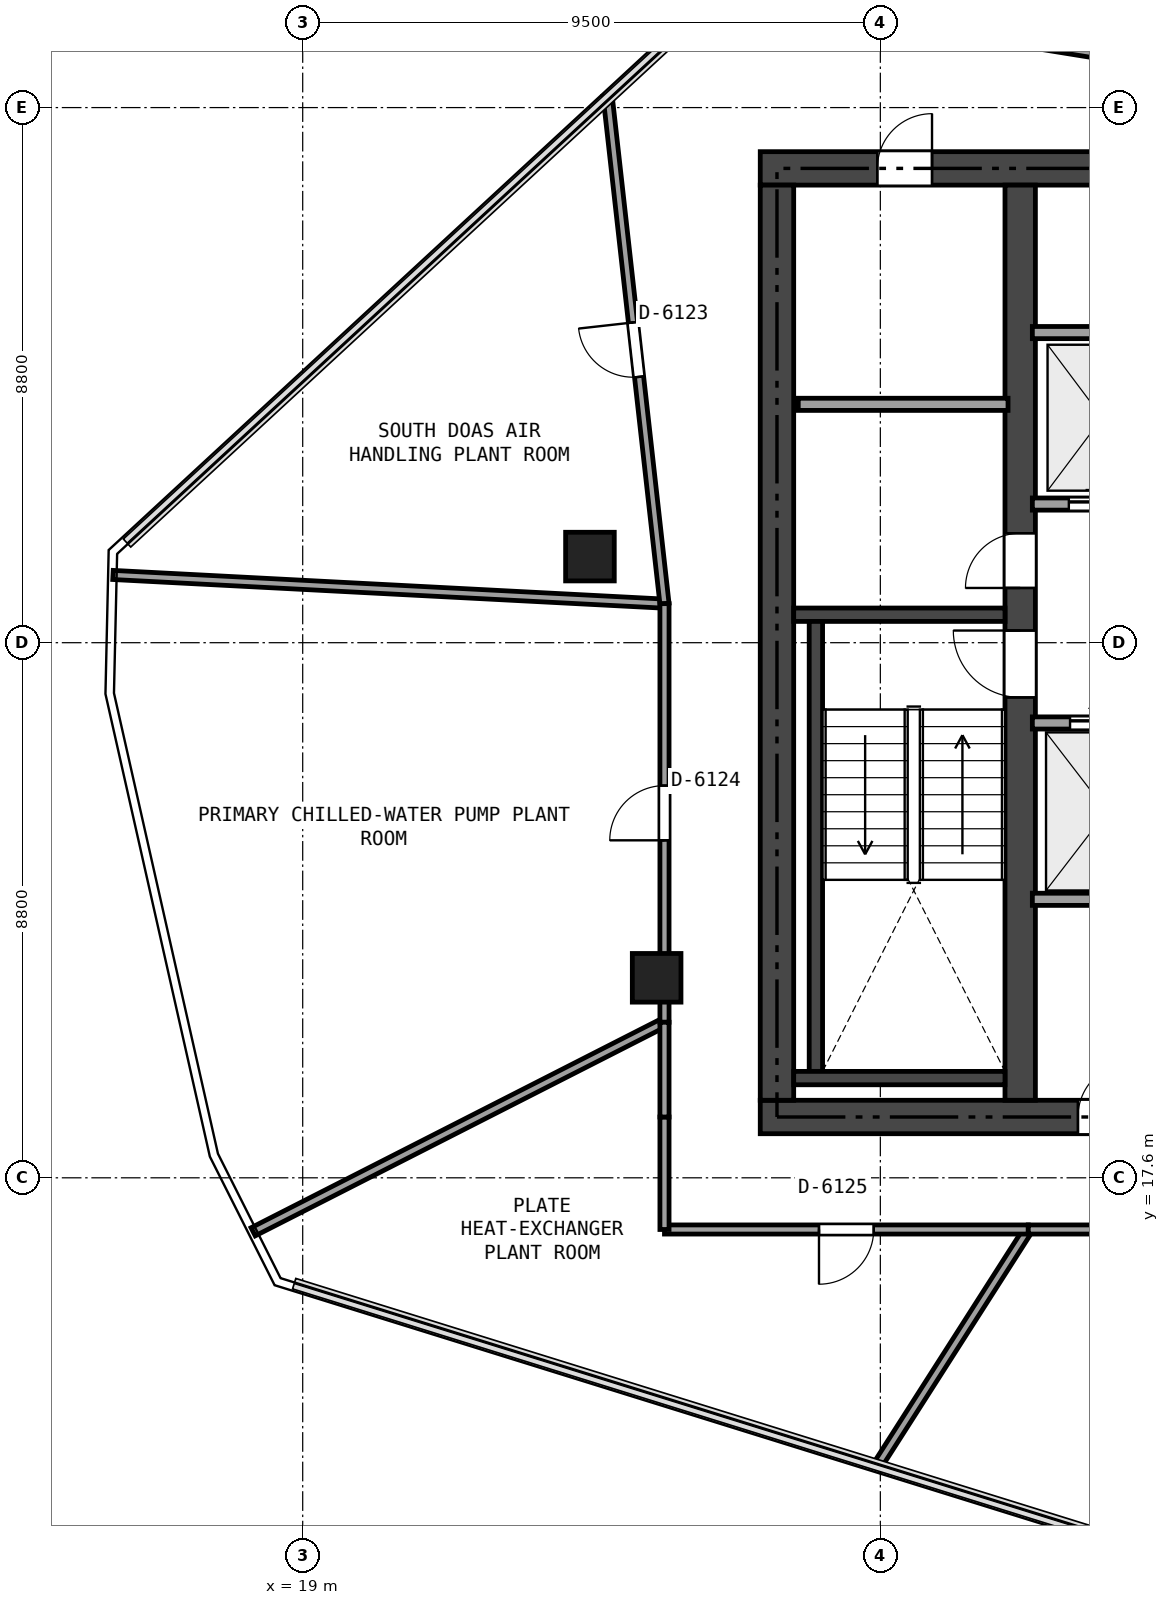
"""IFC4 building model, lengths in metres.
Left out: names, types, materials, properties, quantities, classifications, styles, units other than length and angle.
Written with IfcOpenShell. Run it as: python <this file> out.ifc"""

import sys

from ifc_helpers import new_model, si_unit, direction, frame, frame_2d, origin, origin_2d, place, context, subcontext, project, spatial, rectangle, extrude, element, fill, save


model = new_model("IFC4")
c1 = context("Model", 3, precision=1e-05, world=origin(), true_north=direction((0.0, 1.0)))
c2 = subcontext(c1, "Body", "Model", "MODEL_VIEW")
j1 = project(units=[si_unit("LENGTHUNIT", "METRE"), si_unit("PLANEANGLEUNIT", "RADIAN")], contexts=[c1])
p1 = place(None, origin())
s1 = spatial("IfcSite", under=j1, at=p1, CompositionType="ELEMENT")
p2 = place(p1, origin())
s2 = spatial("IfcBuilding", under=s1, at=p2, CompositionType="ELEMENT")
p3 = place(p2, frame((0.0, 0.0, 228.3)))
s3 = spatial("IfcBuildingStorey", under=s2, at=p3, CompositionType="ELEMENT", Elevation=228.3)
p4 = place(p3, frame((26.525, 18.6, 0.0), z_axis=(0.0, 0.0, 1.0), x_axis=(1.0, 0.0, 0.0)))
e1 = element("IfcWall", 1, at=p4, inside=s3, PredefinedType="SHEAR", context=c2, shape_type="SweptSolid", body=[
    extrude(rectangle(XDim=21.35, YDim=0.55, at=frame_2d((10.675, 0.0))), origin(), (0.0, 0.0, 1.0), 3.24),
])
p5 = place(p4, frame((12.4, 0.0, 0.0)))
e2 = element("IfcOpeningElement", 2, at=p5, cuts=e1, PredefinedType="OPENING", context=c2, shape_type="SweptSolid", body=[
    extrude(rectangle(XDim=1.15, YDim=2.15, at=frame_2d((0.575, 1.075))), frame((0.0, 0.285, 0.0), z_axis=(0.0, -1.0, 0.0), x_axis=(1.0, 0.0, 0.0)), (0.0, 0.0, 1.0), 0.57),
])
p6 = place(p4, frame((5.225, 0.0, 0.0)))
e3 = element("IfcOpeningElement", 3, at=p6, cuts=e1, PredefinedType="OPENING", context=c2, shape_type="SweptSolid", body=[
    extrude(rectangle(XDim=0.9, YDim=2.1, at=frame_2d((0.45, 1.05))), frame((0.0, 0.285, 0.0), z_axis=(0.0, -1.0, 0.0), x_axis=(1.0, 0.0, 0.0)), (0.0, 0.0, 1.0), 0.57),
])
p7 = place(p3, frame((26.525, 34.2, 0.0), z_axis=(0.0, 0.0, 1.0), x_axis=(1.0, 0.0, 0.0)))
e4 = element("IfcWall", 4, at=p7, inside=s3, PredefinedType="SHEAR", context=c2, shape_type="SweptSolid", body=[
    extrude(rectangle(XDim=21.35, YDim=0.55, at=frame_2d((10.675, 0.0))), origin(), (0.0, 0.0, 1.0), 3.24),
])
p8 = place(p7, frame((9.675, 0.0, 0.0)))
e5 = element("IfcOpeningElement", 5, at=p8, cuts=e4, PredefinedType="OPENING", context=c2, shape_type="SweptSolid", body=[
    extrude(rectangle(XDim=1.1, YDim=2.15, at=frame_2d((0.55, 1.075))), frame((0.0, 0.285, 0.0), z_axis=(0.0, -1.0, 0.0), x_axis=(1.0, 0.0, 0.0)), (0.0, 0.0, 1.0), 0.57),
])
p9 = place(p7, frame((1.925, 0.0, 0.0)))
e6 = element("IfcOpeningElement", 6, at=p9, cuts=e4, PredefinedType="OPENING", context=c2, shape_type="SweptSolid", body=[
    extrude(rectangle(XDim=0.9, YDim=2.1, at=frame_2d((0.45, 1.05))), frame((0.0, 0.285, 0.0), z_axis=(0.0, -1.0, 0.0), x_axis=(1.0, 0.0, 0.0)), (0.0, 0.0, 1.0), 0.57),
])
p10 = place(p7, frame((6.225, 0.0, 0.0)))
e7 = element("IfcOpeningElement", 7, at=p10, cuts=e4, PredefinedType="OPENING", context=c2, shape_type="SweptSolid", body=[
    extrude(rectangle(XDim=0.9, YDim=2.1, at=frame_2d((0.45, 1.05))), frame((0.0, 0.285, 0.0), z_axis=(0.0, -1.0, 0.0), x_axis=(1.0, 0.0, 0.0)), (0.0, 0.0, 1.0), 0.57),
])
p11 = place(p3, frame((26.8, 18.875, 0.0), z_axis=(0.0, 0.0, 1.0), x_axis=(0.0, 1.0, 0.0)))
e8 = element("IfcWall", 8, at=p11, inside=s3, PredefinedType="SHEAR", context=c2, shape_type="SweptSolid", body=[
    extrude(rectangle(XDim=15.05, YDim=0.55, at=frame_2d((7.525, 0.0))), origin(), (0.0, 0.0, 1.0), 3.24),
])
p12 = place(p3, frame((30.8, 18.875, 0.0), z_axis=(0.0, 0.0, 1.0), x_axis=(0.0, 1.0, 0.0)))
e9 = element("IfcWall", 9, at=p12, inside=s3, PredefinedType="SHEAR", context=c2, shape_type="SweptSolid", body=[
    extrude(rectangle(XDim=15.05, YDim=0.5, at=frame_2d((7.525, 0.0))), origin(), (0.0, 0.0, 1.0), 3.24),
])
p13 = place(p12, frame((6.625, 0.0, 0.0)))
e10 = element("IfcOpeningElement", 10, at=p13, cuts=e9, PredefinedType="OPENING", context=c2, shape_type="SweptSolid", body=[
    extrude(rectangle(XDim=1.1, YDim=2.15, at=frame_2d((0.55, 1.075))), frame((0.0, 0.26, 0.0), z_axis=(0.0, -1.0, 0.0), x_axis=(1.0, 0.0, 0.0)), (0.0, 0.0, 1.0), 0.52),
])
p14 = place(p12, frame((8.425, 0.0, 0.0)))
e11 = element("IfcOpeningElement", 11, at=p14, cuts=e9, PredefinedType="OPENING", context=c2, shape_type="SweptSolid", body=[
    extrude(rectangle(XDim=0.9, YDim=2.1, at=frame_2d((0.45, 1.05))), frame((0.0, 0.26, 0.0), z_axis=(0.0, -1.0, 0.0), x_axis=(1.0, 0.0, 0.0)), (0.0, 0.0, 1.0), 0.52),
])
p15 = place(p3, frame((27.075, 26.86, 0.0), z_axis=(0.0, 0.0, 1.0), x_axis=(1.0, 0.0, 0.0)))
e12 = element("IfcWall", 12, at=p15, inside=s3, PredefinedType="SHEAR", context=c2, shape_type="SweptSolid", body=[
    extrude(rectangle(XDim=3.475, YDim=0.22, at=frame_2d((1.738, 0.0))), origin(), (0.0, 0.0, 1.0), 3.24),
])
p16 = place(p3, frame((27.44, 19.35, 0.0), z_axis=(0.0, 0.0, 1.0), x_axis=(0.0, 1.0, 0.0)))
e13 = element("IfcWall", 13, at=p16, inside=s3, PredefinedType="SHEAR", context=c2, shape_type="SweptSolid", body=[
    extrude(rectangle(XDim=7.4, YDim=0.22, at=frame_2d((3.7, 0.0))), origin(), (0.0, 0.0, 1.0), 3.24),
])
p17 = place(p3, frame((27.075, 19.24, 0.0), z_axis=(0.0, 0.0, 1.0), x_axis=(1.0, 0.0, 0.0)))
e14 = element("IfcWall", 14, at=p17, inside=s3, PredefinedType="SHEAR", context=c2, shape_type="SweptSolid", body=[
    extrude(rectangle(XDim=3.475, YDim=0.22, at=frame_2d((1.738, 0.0))), origin(), (0.0, 0.0, 1.0), 3.24),
])
for number, where, z_axis, x_axis in (
    (15, (23.724, 27.816, -0.345), (0.0, 0.0, 1.0), (1.0, 0.0, 0.0)),
    (16, (24.821, 20.889, -0.345), (0.0, 0.0, 1.0), (1.0, 0.0, 0.0)),
):
    element("IfcColumn", number, at=place(p3, frame(where, z_axis=z_axis, x_axis=x_axis)), inside=s3, PredefinedType="COLUMN", context=c2, shape_type="SweptSolid", body=[
        extrude(rectangle(XDim=0.8, YDim=0.8, at=origin_2d()), origin(), (0.0, 0.0, 1.0), 3.585),
    ])
p18 = place(p3, frame((27.15, 30.32, 0.0), z_axis=(0.0, 0.0, 1.0), x_axis=(1.0, 0.0, 0.0)))
e17 = element("IfcWall", 17, at=p18, inside=s3, PredefinedType="SOLIDWALL", context=c2, shape_type="SweptSolid", body=[
    extrude(rectangle(XDim=3.45, YDim=0.2, at=frame_2d((1.725, 0.0))), origin(), (0.0, 0.0, 1.0), 2.913),
])
p19 = place(p3, frame((31.0, 28.68, 0.0), z_axis=(0.0, 0.0, 1.0), x_axis=(1.0, 0.0, 0.0)))
e18 = element("IfcWall", 18, at=p19, inside=s3, PredefinedType="SOLIDWALL", context=c2, shape_type="SweptSolid", body=[
    extrude(rectangle(XDim=4.42, YDim=0.2, at=frame_2d((2.21, 0.0))), origin(), (0.0, 0.0, 1.0), 3.24),
])
p20 = place(p19, frame((0.6, 0.0, 0.0)))
e19 = element("IfcOpeningElement", 19, at=p20, cuts=e18, PredefinedType="OPENING", context=c2, shape_type="SweptSolid", body=[
    extrude(rectangle(XDim=1.1, YDim=2.15, at=frame_2d((0.55, 1.075))), frame((0.0, 0.11, 0.0), z_axis=(0.0, -1.0, 0.0), x_axis=(1.0, 0.0, 0.0)), (0.0, 0.0, 1.0), 0.22),
])
p21 = place(p19, frame((2.85, 0.0, 0.0)))
e20 = element("IfcOpeningElement", 20, at=p21, cuts=e18, PredefinedType="OPENING", context=c2, shape_type="SweptSolid", body=[
    extrude(rectangle(XDim=1.1, YDim=2.15, at=frame_2d((0.55, 1.075))), frame((0.0, 0.11, 0.0), z_axis=(0.0, -1.0, 0.0), x_axis=(1.0, 0.0, 0.0)), (0.0, 0.0, 1.0), 0.22),
])
p22 = place(p3, frame((31.0, 31.5, 0.0), z_axis=(0.0, 0.0, 1.0), x_axis=(1.0, 0.0, 0.0)))
e21 = element("IfcWall", 21, at=p22, inside=s3, PredefinedType="SOLIDWALL", context=c2, shape_type="SweptSolid", body=[
    extrude(rectangle(XDim=4.42, YDim=0.2, at=frame_2d((2.21, 0.0))), origin(), (0.0, 0.0, 1.0), 3.24),
])
p23 = place(p3, frame((31.0, 25.08, 0.0), z_axis=(0.0, 0.0, 1.0), x_axis=(1.0, 0.0, 0.0)))
e22 = element("IfcWall", 22, at=p23, inside=s3, PredefinedType="SOLIDWALL", context=c2, shape_type="SweptSolid", body=[
    extrude(rectangle(XDim=4.42, YDim=0.2, at=frame_2d((2.21, 0.0))), origin(), (0.0, 0.0, 1.0), 3.24),
])
p24 = place(p23, frame((3.0, 0.0, 0.0)))
e23 = element("IfcOpeningElement", 23, at=p24, cuts=e22, PredefinedType="OPENING", context=c2, shape_type="SweptSolid", body=[
    extrude(rectangle(XDim=0.9, YDim=2.1, at=frame_2d((0.45, 1.05))), frame((0.0, 0.11, 0.0), z_axis=(0.0, -1.0, 0.0), x_axis=(1.0, 0.0, 0.0)), (0.0, 0.0, 1.0), 0.22),
])
p25 = place(p23, frame((0.62, 0.0, 0.0)))
e24 = element("IfcOpeningElement", 24, at=p25, cuts=e22, PredefinedType="OPENING", context=c2, shape_type="SweptSolid", body=[
    extrude(rectangle(XDim=1.2, YDim=2.15, at=frame_2d((0.6, 1.075))), frame((0.0, 0.11, 0.0), z_axis=(0.0, -1.0, 0.0), x_axis=(1.0, 0.0, 0.0)), (0.0, 0.0, 1.0), 0.22),
])
p26 = place(p3, frame((31.0, 22.18, 0.0), z_axis=(0.0, 0.0, 1.0), x_axis=(1.0, 0.0, 0.0)))
e25 = element("IfcWall", 25, at=p26, inside=s3, PredefinedType="SOLIDWALL", context=c2, shape_type="SweptSolid", body=[
    extrude(rectangle(XDim=2.42, YDim=0.2, at=frame_2d((1.21, 0.0))), origin(), (0.0, 0.0, 1.0), 3.24),
])
p27 = place(p3, frame((29.839, 40.775, 0.0), z_axis=(0.0, 0.0, 1.0), x_axis=(0.459416676004, -0.888220872199, 0.0)))
e26 = element("IfcWall", 26, at=p27, inside=s3, PredefinedType="PARTITIONING", context=c2, shape_type="SweptSolid", body=[
    extrude(rectangle(XDim=5.319, YDim=0.15, at=frame_2d((2.66, 0.0))), origin(), (0.0, 0.0, 1.0), 2.765),
])
p28 = place(p3, frame((25.85, 37.087, 0.0), z_axis=(0.0, 0.0, 1.0), x_axis=(0.987257835499, -0.159128772529, 0.0)))
e27 = element("IfcWall", 27, at=p28, inside=s3, PredefinedType="PARTITIONING", context=c2, shape_type="SweptSolid", body=[
    extrude(rectangle(XDim=6.516, YDim=0.15, at=frame_2d((3.258, 0.0))), origin(), (0.0, 0.0, 1.0), 2.689),
])
p29 = place(p28, frame((0.24, 0.0, 0.0)))
e28 = element("IfcOpeningElement", 28, at=p29, cuts=e27, PredefinedType="OPENING", context=c2, shape_type="SweptSolid", body=[
    extrude(rectangle(XDim=0.9, YDim=2.0, at=frame_2d((0.45, 1.0))), frame((0.0, 0.085, 0.0), z_axis=(0.0, -1.0, 0.0), x_axis=(1.0, 0.0, 0.0)), (0.0, 0.0, 1.0), 0.17),
])
p30 = place(p3, frame((15.88, 27.514, 0.0), z_axis=(0.0, 0.0, 1.0), x_axis=(0.998649134868, -0.051960614188, 0.0)))
e29 = element("IfcWall", 29, at=p30, inside=s3, PredefinedType="PARTITIONING", context=c2, shape_type="SweptSolid", body=[
    extrude(rectangle(XDim=9.082, YDim=0.15, at=frame_2d((4.541, 0.0))), origin(), (0.0, 0.0, 1.0), 2.765),
])
p31 = place(p3, frame((24.95, 27.042, 0.0), z_axis=(0.0, 0.0, 1.0), x_axis=(-0.111362366536, 0.99377986663, 0.0)))
e30 = element("IfcWall", 30, at=p31, inside=s3, PredefinedType="PARTITIONING", context=c2, shape_type="SweptSolid", body=[
    extrude(rectangle(XDim=8.405, YDim=0.15, at=frame_2d((4.203, 0.0))), origin(), (0.0, 0.0, 1.0), 2.689),
])
p32 = place(p31, frame((3.753, 0.0, 0.0)))
e31 = element("IfcOpeningElement", 31, at=p32, cuts=e30, PredefinedType="OPENING", context=c2, shape_type="SweptSolid", body=[
    extrude(rectangle(XDim=0.9, YDim=2.0, at=frame_2d((0.45, 1.0))), frame((0.0, 0.085, 0.0), z_axis=(0.0, -1.0, 0.0), x_axis=(1.0, 0.0, 0.0)), (0.0, 0.0, 1.0), 0.17),
])
p33 = place(p3, frame((18.185, 16.712, 0.0), z_axis=(0.0, 0.0, 1.0), x_axis=(0.891051276118, 0.453902658429, 0.0)))
e32 = element("IfcWall", 32, at=p33, inside=s3, PredefinedType="PARTITIONING", context=c2, shape_type="SweptSolid", body=[
    extrude(rectangle(XDim=7.592, YDim=0.15, at=frame_2d((3.796, 0.0))), origin(), (0.0, 0.0, 1.0), 3.24),
])
p34 = place(p3, frame((24.95, 20.158, 0.0), z_axis=(0.0, 0.0, 1.0), x_axis=(0.0, 1.0, 0.0)))
e33 = element("IfcWall", 33, at=p34, inside=s3, PredefinedType="PARTITIONING", context=c2, shape_type="SweptSolid", body=[
    extrude(rectangle(XDim=6.884, YDim=0.15, at=frame_2d((3.442, 0.0))), origin(), (0.0, 0.0, 1.0), 2.913),
])
p35 = place(p34, frame((2.992, 0.0, 0.0)))
e34 = element("IfcOpeningElement", 34, at=p35, cuts=e33, PredefinedType="OPENING", context=c2, shape_type="SweptSolid", body=[
    extrude(rectangle(XDim=0.9, YDim=2.0, at=frame_2d((0.45, 1.0))), frame((0.0, 0.085, 0.0), z_axis=(0.0, -1.0, 0.0), x_axis=(1.0, 0.0, 0.0)), (0.0, 0.0, 1.0), 0.17),
])
p36 = place(p3, frame((28.431, 12.837, 0.0), z_axis=(0.0, 0.0, 1.0), x_axis=(0.53872103206, 0.842484213274, 0.0)))
e35 = element("IfcWall", 35, at=p36, inside=s3, PredefinedType="PARTITIONING", context=c2, shape_type="SweptSolid", body=[
    extrude(rectangle(XDim=4.645, YDim=0.15, at=frame_2d((2.322, 0.0))), origin(), (0.0, 0.0, 1.0), 2.765),
])
p37 = place(p3, frame((30.933, 16.75, 0.0), z_axis=(0.0, 0.0, 1.0), x_axis=(-1.0, 0.0, 0.0)))
e36 = element("IfcWall", 36, at=p37, inside=s3, PredefinedType="PARTITIONING", context=c2, shape_type="SweptSolid", body=[
    extrude(rectangle(XDim=5.983, YDim=0.15, at=frame_2d((2.992, 0.0))), origin(), (0.0, 0.0, 1.0), 2.765),
])
p38 = place(p37, frame((2.542, 0.0, 0.0)))
e37 = element("IfcOpeningElement", 37, at=p38, cuts=e36, PredefinedType="OPENING", context=c2, shape_type="SweptSolid", body=[
    extrude(rectangle(XDim=0.9, YDim=2.0, at=frame_2d((0.45, 1.0))), frame((0.0, 0.085, 0.0), z_axis=(0.0, -1.0, 0.0), x_axis=(1.0, 0.0, 0.0)), (0.0, 0.0, 1.0), 0.17),
])
p39 = place(p3, frame((24.95, 16.75, 0.0), z_axis=(0.0, 0.0, 1.0), x_axis=(0.0, 1.0, 0.0)))
e38 = element("IfcWall", 38, at=p39, inside=s3, PredefinedType="PARTITIONING", context=c2, shape_type="SweptSolid", body=[
    extrude(rectangle(XDim=1.85, YDim=0.15, at=frame_2d((0.925, 0.0))), origin(), (0.0, 0.0, 1.0), 3.24),
])
p40 = place(p3, frame((24.95, 18.6, 0.0), z_axis=(0.0, 0.0, 1.0), x_axis=(0.0, 1.0, 0.0)))
e39 = element("IfcWall", 39, at=p40, inside=s3, PredefinedType="PARTITIONING", context=c2, shape_type="SweptSolid", body=[
    extrude(rectangle(XDim=1.558, YDim=0.15, at=frame_2d((0.779, 0.0))), origin(), (0.0, 0.0, 1.0), 3.24),
])
p41 = place(p3, frame((36.694, 16.75, 0.0), z_axis=(0.0, 0.0, 1.0), x_axis=(-1.0, 0.0, 0.0)))
e40 = element("IfcWall", 40, at=p41, inside=s3, PredefinedType="PARTITIONING", context=c2, shape_type="SweptSolid", body=[
    extrude(rectangle(XDim=5.761, YDim=0.15, at=frame_2d((2.88, 0.0))), origin(), (0.0, 0.0, 1.0), 2.689),
])
p42 = place(p41, frame((2.431, 0.0, 0.0)))
e41 = element("IfcOpeningElement", 41, at=p42, cuts=e40, PredefinedType="OPENING", context=c2, shape_type="SweptSolid", body=[
    extrude(rectangle(XDim=0.9, YDim=2.0, at=frame_2d((0.45, 1.0))), frame((0.0, 0.085, 0.0), z_axis=(0.0, -1.0, 0.0), x_axis=(1.0, 0.0, 0.0)), (0.0, 0.0, 1.0), 0.17),
])
p43 = place(p13, origin())
e42 = element("IfcDoor", 42, at=p43, inside=s3, OperationType="SINGLE_SWING_RIGHT", PredefinedType="DOOR", context=c2, shape_type="SweptSolid", body=[
    extrude(rectangle(XDim=1.1, YDim=2.15, at=frame_2d((0.55, 1.075))), frame((0.0, 0.025, 0.0), z_axis=(0.0, -1.0, 0.0), x_axis=(1.0, 0.0, 0.0)), (0.0, 0.0, 1.0), 0.05),
])
fill(e10, e42)
p44 = place(p14, origin())
e43 = element("IfcDoor", 43, at=p44, inside=s3, OperationType="SINGLE_SWING_LEFT", PredefinedType="DOOR", context=c2, shape_type="SweptSolid", body=[
    extrude(rectangle(XDim=0.9, YDim=2.1, at=frame_2d((0.45, 1.05))), frame((0.0, 0.025, 0.0), z_axis=(0.0, -1.0, 0.0), x_axis=(1.0, 0.0, 0.0)), (0.0, 0.0, 1.0), 0.05),
])
fill(e11, e43)
p45 = place(p9, origin())
e44 = element("IfcDoor", 44, at=p45, inside=s3, OperationType="SINGLE_SWING_RIGHT", PredefinedType="DOOR", context=c2, shape_type="SweptSolid", body=[
    extrude(rectangle(XDim=0.9, YDim=2.1, at=frame_2d((0.45, 1.05))), frame((0.0, 0.025, 0.0), z_axis=(0.0, -1.0, 0.0), x_axis=(1.0, 0.0, 0.0)), (0.0, 0.0, 1.0), 0.05),
])
fill(e6, e44)
p46 = place(p6, origin())
e45 = element("IfcDoor", 45, at=p46, inside=s3, OperationType="SINGLE_SWING_RIGHT", PredefinedType="DOOR", context=c2, shape_type="SweptSolid", body=[
    extrude(rectangle(XDim=0.9, YDim=2.1, at=frame_2d((0.45, 1.05))), frame((0.0, 0.025, 0.0), z_axis=(0.0, -1.0, 0.0), x_axis=(1.0, 0.0, 0.0)), (0.0, 0.0, 1.0), 0.05),
])
fill(e3, e45)
p47 = place(p20, origin())
e46 = element("IfcDoor", 46, at=p47, inside=s3, OperationType="SLIDING_TO_LEFT", PredefinedType="DOOR", context=c2, shape_type="SweptSolid", body=[
    extrude(rectangle(XDim=1.1, YDim=2.15, at=frame_2d((0.55, 1.075))), frame((0.0, 0.025, 0.0), z_axis=(0.0, -1.0, 0.0), x_axis=(1.0, 0.0, 0.0)), (0.0, 0.0, 1.0), 0.05),
])
fill(e19, e46)
p48 = place(p25, origin())
e47 = element("IfcDoor", 47, at=p48, inside=s3, OperationType="SLIDING_TO_LEFT", PredefinedType="DOOR", context=c2, shape_type="SweptSolid", body=[
    extrude(rectangle(XDim=1.2, YDim=2.15, at=frame_2d((0.6, 1.075))), frame((0.0, 0.025, 0.0), z_axis=(0.0, -1.0, 0.0), x_axis=(1.0, 0.0, 0.0)), (0.0, 0.0, 1.0), 0.05),
])
fill(e24, e47)
p49 = place(p32, origin())
e48 = element("IfcDoor", 48, at=p49, inside=s3, OperationType="SINGLE_SWING_RIGHT", PredefinedType="DOOR", context=c2, shape_type="SweptSolid", body=[
    extrude(rectangle(XDim=0.9, YDim=2.0, at=frame_2d((0.45, 1.0))), frame((0.0, 0.025, 0.0), z_axis=(0.0, -1.0, 0.0), x_axis=(1.0, 0.0, 0.0)), (0.0, 0.0, 1.0), 0.05),
])
fill(e31, e48)
p50 = place(p35, origin())
e49 = element("IfcDoor", 49, at=p50, inside=s3, OperationType="SINGLE_SWING_LEFT", PredefinedType="DOOR", context=c2, shape_type="SweptSolid", body=[
    extrude(rectangle(XDim=0.9, YDim=2.0, at=frame_2d((0.45, 1.0))), frame((0.0, 0.025, 0.0), z_axis=(0.0, -1.0, 0.0), x_axis=(1.0, 0.0, 0.0)), (0.0, 0.0, 1.0), 0.05),
])
fill(e34, e49)
p51 = place(p38, origin())
e50 = element("IfcDoor", 50, at=p51, inside=s3, OperationType="SINGLE_SWING_RIGHT", PredefinedType="DOOR", context=c2, shape_type="SweptSolid", body=[
    extrude(rectangle(XDim=0.9, YDim=2.0, at=frame_2d((0.45, 1.0))), frame((0.0, 0.025, 0.0), z_axis=(0.0, -1.0, 0.0), x_axis=(1.0, 0.0, 0.0)), (0.0, 0.0, 1.0), 0.05),
])
fill(e37, e50)
save(model, sys.argv[1])
